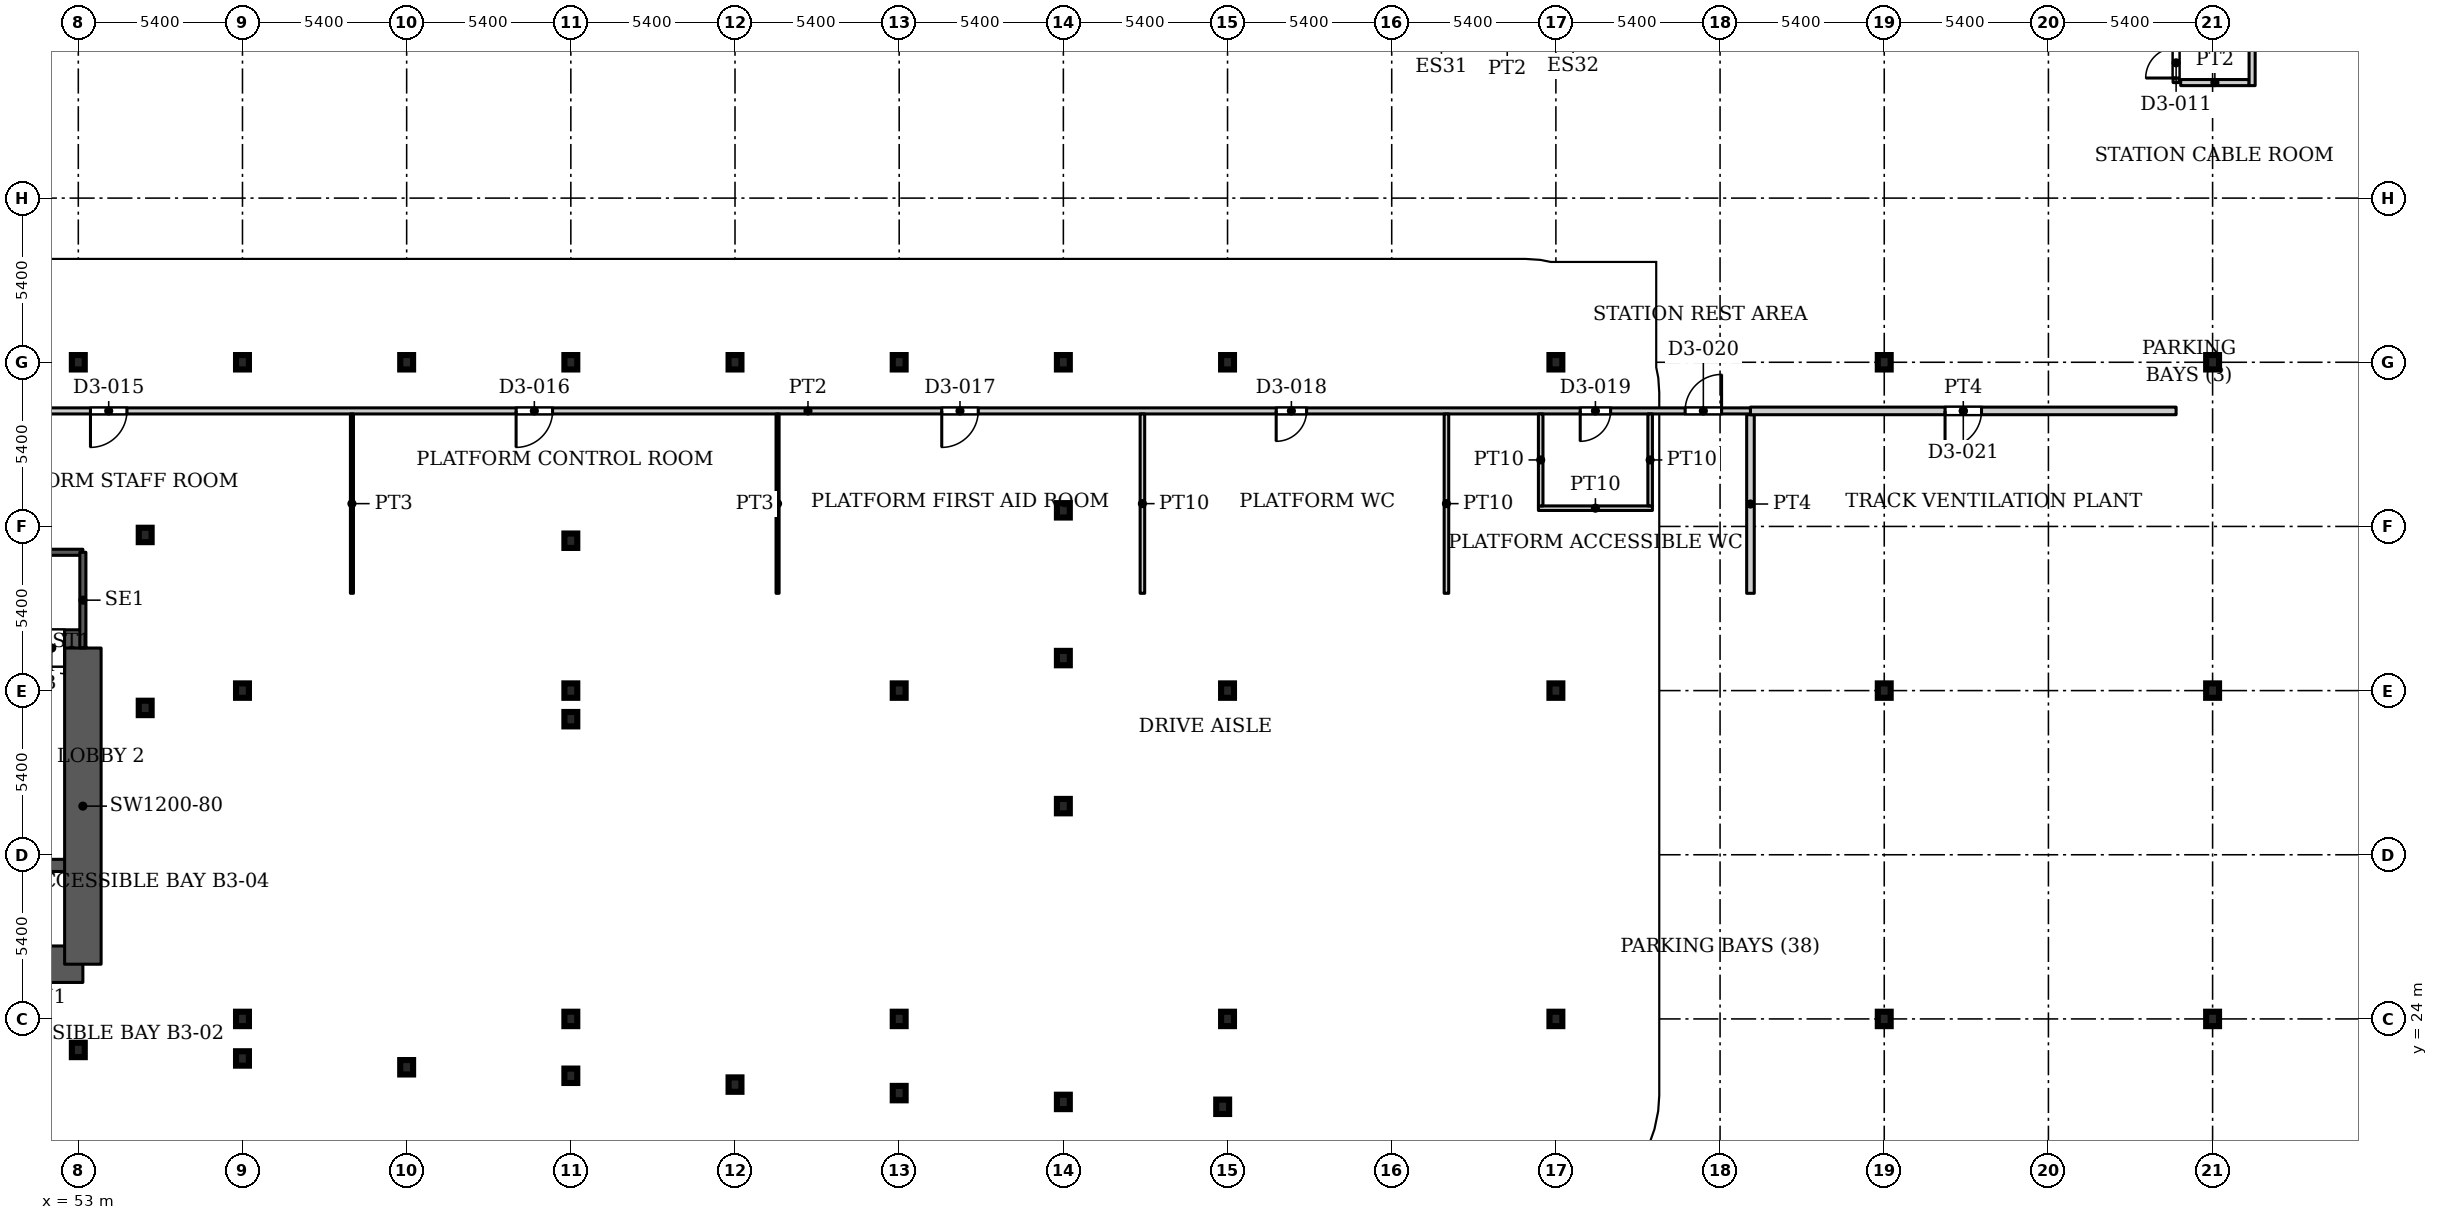
"""IFC4 building model, lengths in metres.
Left out: names, types, materials, properties, quantities, classifications, styles, units other than length and angle.
Written with IfcOpenShell. Run it as: python <this file> out.ifc"""

import sys

from ifc_helpers import new_model, si_unit, direction, frame, frame_2d, origin, origin_2d, place, context, subcontext, project, spatial, rectangle, i_section, extrude, source, transform, mapped, element, fill, save


model = new_model("IFC4")
c1 = context("Model", 3, precision=1e-05, world=origin(), true_north=direction((0.0, 1.0)))
c2 = subcontext(c1, "Body", "Model", "MODEL_VIEW")
j1 = project(units=[si_unit("LENGTHUNIT", "METRE"), si_unit("PLANEANGLEUNIT", "RADIAN")], contexts=[c1])
p1 = place(None, origin())
s1 = spatial("IfcSite", under=j1, at=p1, CompositionType="ELEMENT")
p2 = place(p1, origin())
s2 = spatial("IfcBuilding", under=s1, at=p2, CompositionType="ELEMENT")
p3 = place(p2, frame((0.0, 0.0, -15.0)))
s3 = spatial("IfcBuildingStorey", under=s2, at=p3, CompositionType="ELEMENT", Elevation=-15.0)
for number, where, z_axis, x_axis in (
    (1, (58.4, 24.0, 0.0), (0.0, 0.0, 1.0), (1.0, 0.0, 0.0)),
    (2, (69.2, 24.0, 0.0), (0.0, 0.0, 1.0), (1.0, 0.0, 0.0)),
    (3, (80.0, 24.0, 0.0), (0.0, 0.0, 1.0), (1.0, 0.0, 0.0)),
    (4, (90.8, 24.0, 0.0), (0.0, 0.0, 1.0), (1.0, 0.0, 0.0)),
    (5, (101.6, 24.0, 0.0), (0.0, 0.0, 1.0), (1.0, 0.0, 0.0)),
    (6, (112.4, 24.0, 0.0), (0.0, 0.0, 1.0), (1.0, 0.0, 0.0)),
    (7, (123.2, 24.0, 0.0), (0.0, 0.0, 1.0), (1.0, 0.0, 0.0)),
    (8, (58.4, 34.8, 0.0), (0.0, 0.0, 1.0), (1.0, 0.0, 0.0)),
    (9, (69.2, 34.8, 0.0), (0.0, 0.0, 1.0), (1.0, 0.0, 0.0)),
    (10, (80.0, 34.8, 0.0), (0.0, 0.0, 1.0), (1.0, 0.0, 0.0)),
    (11, (90.8, 34.8, 0.0), (0.0, 0.0, 1.0), (1.0, 0.0, 0.0)),
    (12, (101.6, 34.8, 0.0), (0.0, 0.0, 1.0), (1.0, 0.0, 0.0)),
    (13, (112.4, 34.8, 0.0), (0.0, 0.0, 1.0), (1.0, 0.0, 0.0)),
    (14, (123.2, 34.8, 0.0), (0.0, 0.0, 1.0), (1.0, 0.0, 0.0)),
    (15, (58.4, 45.6, 0.0), (0.0, 0.0, 1.0), (1.0, 0.0, 0.0)),
    (16, (69.2, 45.6, 0.0), (0.0, 0.0, 1.0), (1.0, 0.0, 0.0)),
    (17, (80.0, 45.6, 0.0), (0.0, 0.0, 1.0), (1.0, 0.0, 0.0)),
    (18, (90.8, 45.6, 0.0), (0.0, 0.0, 1.0), (1.0, 0.0, 0.0)),
    (19, (101.6, 45.6, 0.0), (0.0, 0.0, 1.0), (1.0, 0.0, 0.0)),
    (20, (112.4, 45.6, 0.0), (0.0, 0.0, 1.0), (1.0, 0.0, 0.0)),
    (21, (123.2, 45.6, 0.0), (0.0, 0.0, 1.0), (1.0, 0.0, 0.0)),
    (22, (90.64, 21.11, 0.0), (0.0, 0.0, 1.0), (1.0, 0.0, 0.0)),
    (23, (85.4, 21.27, 0.0), (0.0, 0.0, 1.0), (1.0, 0.0, 0.0)),
    (24, (80.0, 21.56, 0.0), (0.0, 0.0, 1.0), (1.0, 0.0, 0.0)),
    (25, (74.6, 21.84, 0.0), (0.0, 0.0, 1.0), (1.0, 0.0, 0.0)),
    (26, (69.2, 22.13, 0.0), (0.0, 0.0, 1.0), (1.0, 0.0, 0.0)),
    (27, (63.8, 22.41, 0.0), (0.0, 0.0, 1.0), (1.0, 0.0, 0.0)),
    (28, (58.4, 22.7, 0.0), (0.0, 0.0, 1.0), (1.0, 0.0, 0.0)),
    (29, (53.0, 22.98, 0.0), (0.0, 0.0, 1.0), (1.0, 0.0, 0.0)),
    (30, (53.0, 45.6, 0.0), (0.0, 0.0, 1.0), (1.0, 0.0, 0.0)),
    (31, (63.8, 45.6, 0.0), (0.0, 0.0, 1.0), (1.0, 0.0, 0.0)),
    (32, (74.6, 45.6, 0.0), (0.0, 0.0, 1.0), (1.0, 0.0, 0.0)),
    (33, (85.4, 45.6, 0.0), (0.0, 0.0, 1.0), (1.0, 0.0, 0.0)),
    (34, (85.4, 31.0, 0.0), (0.0, 0.0, 1.0), (1.0, 0.0, 0.0)),
    (35, (69.2, 33.86, 0.0), (0.0, 0.0, 1.0), (1.0, 0.0, 0.0)),
    (36, (55.2, 34.23, 0.0), (0.0, 0.0, 1.0), (1.0, 0.0, 0.0)),
    (37, (85.4, 35.87, 0.0), (0.0, 0.0, 1.0), (1.0, 0.0, 0.0)),
    (38, (69.2, 39.73, 0.0), (0.0, 0.0, 1.0), (1.0, 0.0, 0.0)),
    (39, (55.2, 39.92, 0.0), (0.0, 0.0, 1.0), (1.0, 0.0, 0.0)),
    (40, (85.4, 40.73, 0.0), (0.0, 0.0, 1.0), (1.0, 0.0, 0.0)),
):
    element("IfcColumn", number, at=place(p3, frame(where, z_axis=z_axis, x_axis=x_axis)), inside=s3, PredefinedType="COLUMN", context=c2, shape_type="SweptSolid", body=[
        extrude(i_section(OverallWidth=0.424, OverallDepth=0.474, WebThickness=0.048, FlangeThickness=0.077, FilletRadius=0.014, at=origin_2d()), origin(), (0.0, 0.0, 1.0), 5.0),
    ])
p4 = place(p3, frame((34.75, 25.8, 0.0), z_axis=(0.0, 0.0, 1.0), x_axis=(1.0, 0.0, 0.0)))
e41 = element("IfcWall", 41, at=p4, inside=s3, PredefinedType="SHEAR", context=c2, shape_type="SweptSolid", body=[
    extrude(rectangle(XDim=18.4, YDim=1.2, at=frame_2d((9.2, 0.0))), origin(), (0.0, 0.0, 1.0), 5.0),
])
p5 = place(p3, frame((34.75, 29.05, 0.0), z_axis=(0.0, 0.0, 1.0), x_axis=(1.0, 0.0, 0.0)))
e42 = element("IfcWall", 42, at=p5, inside=s3, PredefinedType="SHEAR", context=c2, shape_type="SweptSolid", body=[
    extrude(rectangle(XDim=18.4, YDim=0.4, at=frame_2d((9.2, 0.0))), origin(), (0.0, 0.0, 1.0), 5.0),
])
p6 = place(p5, frame((15.125, 0.0, 0.0)))
e43 = element("IfcOpeningElement", 43, at=p6, cuts=e42, PredefinedType="OPENING", context=c2, shape_type="SweptSolid", body=[
    extrude(rectangle(XDim=1.1, YDim=2.2, at=frame_2d((0.55, 1.1))), frame((0.0, 0.21, 0.0), z_axis=(0.0, -1.0, 0.0), x_axis=(1.0, 0.0, 0.0)), (0.0, 0.0, 1.0), 0.42),
])
p7 = place(p3, frame((34.75, 36.2, 0.0), z_axis=(0.0, 0.0, 1.0), x_axis=(1.0, 0.0, 0.0)))
e44 = element("IfcWall", 44, at=p7, inside=s3, PredefinedType="SHEAR", context=c2, shape_type="SweptSolid", body=[
    extrude(rectangle(XDim=18.4, YDim=1.2, at=frame_2d((9.2, 0.0))), origin(), (0.0, 0.0, 1.0), 5.0),
])
p8 = place(p7, frame((16.955, 0.0, 0.0)))
e45 = element("IfcOpeningElement", 45, at=p8, cuts=e44, PredefinedType="OPENING", context=c2, shape_type="SweptSolid", body=[
    extrude(rectangle(XDim=0.843, YDim=2.2, at=frame_2d((0.421, 1.1))), frame((0.0, 0.61, 0.0), z_axis=(0.0, -1.0, 0.0), x_axis=(1.0, 0.0, 0.0)), (0.0, 0.0, 1.0), 1.22),
])
p9 = place(p3, frame((53.15, 25.8, 0.0), z_axis=(0.0, 0.0, 1.0), x_axis=(0.0, 1.0, 0.0)))
e46 = element("IfcWall", 46, at=p9, inside=s3, PredefinedType="SHEAR", context=c2, shape_type="SweptSolid", body=[
    extrude(rectangle(XDim=10.4, YDim=1.2, at=frame_2d((5.2, 0.0))), origin(), (0.0, 0.0, 1.0), 5.0),
])
p10 = place(p3, frame((43.99, 39.35, 0.0), z_axis=(0.0, 0.0, 1.0), x_axis=(1.0, 0.0, 0.0)))
e47 = element("IfcWall", 47, at=p10, inside=s3, PredefinedType="SHEAR", context=c2, shape_type="SweptSolid", body=[
    extrude(rectangle(XDim=9.16, YDim=0.2, at=frame_2d((4.58, 0.0))), origin(), (0.0, 0.0, 1.0), 5.0),
])
p11 = place(p3, frame((53.15, 36.2, 0.0), z_axis=(0.0, 0.0, 1.0), x_axis=(0.0, 1.0, 0.0)))
e48 = element("IfcWall", 48, at=p11, inside=s3, PredefinedType="SHEAR", context=c2, shape_type="SweptSolid", body=[
    extrude(rectangle(XDim=3.15, YDim=0.2, at=frame_2d((1.575, 0.0))), origin(), (0.0, 0.0, 1.0), 5.0),
])
p12 = place(p3, frame((46.0, 44.0, 0.0), z_axis=(0.0, 0.0, 1.0), x_axis=(1.0, 0.0, 0.0)))
e49 = element("IfcWall", 49, at=p12, inside=s3, PredefinedType="PARTITIONING", context=c2, shape_type="SweptSolid", body=[
    extrude(rectangle(XDim=62.0, YDim=0.2, at=frame_2d((31.0, 0.0))), origin(), (0.0, 0.0, 1.0), 4.68),
])
p13 = place(p12, frame((7.4, 0.0, 0.0)))
e50 = element("IfcOpeningElement", 50, at=p13, cuts=e49, PredefinedType="OPENING", context=c2, shape_type="SweptSolid", body=[
    extrude(rectangle(XDim=1.2, YDim=2.1, at=frame_2d((0.6, 1.05))), frame((0.0, 0.11, 0.0), z_axis=(0.0, -1.0, 0.0), x_axis=(1.0, 0.0, 0.0)), (0.0, 0.0, 1.0), 0.22),
])
p14 = place(p12, frame((21.4, 0.0, 0.0)))
e51 = element("IfcOpeningElement", 51, at=p14, cuts=e49, PredefinedType="OPENING", context=c2, shape_type="SweptSolid", body=[
    extrude(rectangle(XDim=1.2, YDim=2.1, at=frame_2d((0.6, 1.05))), frame((0.0, 0.11, 0.0), z_axis=(0.0, -1.0, 0.0), x_axis=(1.0, 0.0, 0.0)), (0.0, 0.0, 1.0), 0.22),
])
p15 = place(p12, frame((35.4, 0.0, 0.0)))
e52 = element("IfcOpeningElement", 52, at=p15, cuts=e49, PredefinedType="OPENING", context=c2, shape_type="SweptSolid", body=[
    extrude(rectangle(XDim=1.2, YDim=2.1, at=frame_2d((0.6, 1.05))), frame((0.0, 0.11, 0.0), z_axis=(0.0, -1.0, 0.0), x_axis=(1.0, 0.0, 0.0)), (0.0, 0.0, 1.0), 0.22),
])
p16 = place(p12, frame((46.4, 0.0, 0.0)))
e53 = element("IfcOpeningElement", 53, at=p16, cuts=e49, PredefinedType="OPENING", context=c2, shape_type="SweptSolid", body=[
    extrude(rectangle(XDim=1.0, YDim=2.1, at=frame_2d((0.5, 1.05))), frame((0.0, 0.11, 0.0), z_axis=(0.0, -1.0, 0.0), x_axis=(1.0, 0.0, 0.0)), (0.0, 0.0, 1.0), 0.22),
])
p17 = place(p12, frame((56.4, 0.0, 0.0)))
e54 = element("IfcOpeningElement", 54, at=p17, cuts=e49, PredefinedType="OPENING", context=c2, shape_type="SweptSolid", body=[
    extrude(rectangle(XDim=1.0, YDim=2.1, at=frame_2d((0.5, 1.05))), frame((0.0, 0.11, 0.0), z_axis=(0.0, -1.0, 0.0), x_axis=(1.0, 0.0, 0.0)), (0.0, 0.0, 1.0), 0.22),
])
p18 = place(p12, frame((59.85, 0.0, 0.0)))
e55 = element("IfcOpeningElement", 55, at=p18, cuts=e49, PredefinedType="OPENING", context=c2, shape_type="SweptSolid", body=[
    extrude(rectangle(XDim=1.2, YDim=2.1, at=frame_2d((0.6, 1.05))), frame((0.0, 0.11, 0.0), z_axis=(0.0, -1.0, 0.0), x_axis=(1.0, 0.0, 0.0)), (0.0, 0.0, 1.0), 0.22),
])
for number, where, z_axis, x_axis in (
    (56, (62.0, 38.0, 0.0), (0.0, 0.0, 1.0), (0.0, 1.0, 0.0)),
    (57, (76.0, 38.0, 0.0), (0.0, 0.0, 1.0), (0.0, 1.0, 0.0)),
):
    element("IfcWall", number, at=place(p3, frame(where, z_axis=z_axis, x_axis=x_axis)), inside=s3, PredefinedType="PARTITIONING", context=c2, shape_type="SweptSolid", body=[
        extrude(rectangle(XDim=5.9, YDim=0.1, at=frame_2d((2.95, 0.0))), origin(), (0.0, 0.0, 1.0), 4.68),
    ])
for number, where, z_axis, x_axis in (
    (58, (88.0, 38.0, 0.0), (0.0, 0.0, 1.0), (0.0, 1.0, 0.0)),
    (59, (98.0, 38.0, 0.0), (0.0, 0.0, 1.0), (0.0, 1.0, 0.0)),
):
    element("IfcWall", number, at=place(p3, frame(where, z_axis=z_axis, x_axis=x_axis)), inside=s3, PredefinedType="PARTITIONING", context=c2, shape_type="SweptSolid", body=[
        extrude(rectangle(XDim=5.9, YDim=0.15, at=frame_2d((2.95, 0.0))), origin(), (0.0, 0.0, 1.0), 4.68),
    ])
p19 = place(p3, frame((101.025, 40.8, 0.0), z_axis=(0.0, 0.0, 1.0), x_axis=(1.0, 0.0, 0.0)))
e60 = element("IfcWall", 60, at=p19, inside=s3, PredefinedType="PARTITIONING", context=c2, shape_type="SweptSolid", body=[
    extrude(rectangle(XDim=3.75, YDim=0.15, at=frame_2d((1.875, 0.0))), origin(), (0.0, 0.0, 1.0), 4.68),
])
for number, where, z_axis, x_axis in (
    (61, (101.1, 40.875, 0.0), (0.0, 0.0, 1.0), (0.0, 1.0, 0.0)),
    (62, (104.7, 40.875, 0.0), (0.0, 0.0, 1.0), (0.0, 1.0, 0.0)),
):
    element("IfcWall", number, at=place(p3, frame(where, z_axis=z_axis, x_axis=x_axis)), inside=s3, PredefinedType="PARTITIONING", context=c2, shape_type="SweptSolid", body=[
        extrude(rectangle(XDim=3.025, YDim=0.15, at=frame_2d((1.512, 0.0))), origin(), (0.0, 0.0, 1.0), 4.68),
    ])
p20 = place(p3, frame((108.0, 38.0, 0.0), z_axis=(0.0, 0.0, 1.0), x_axis=(0.0, 1.0, 0.0)))
e63 = element("IfcWall", 63, at=p20, inside=s3, PredefinedType="PARTITIONING", context=c2, shape_type="SweptSolid", body=[
    extrude(rectangle(XDim=5.875, YDim=0.25, at=frame_2d((2.938, 0.0))), origin(), (0.0, 0.0, 1.0), 4.68),
])
p21 = place(p3, frame((108.0, 44.0, 0.0), z_axis=(0.0, 0.0, 1.0), x_axis=(1.0, 0.0, 0.0)))
e64 = element("IfcWall", 64, at=p21, inside=s3, PredefinedType="PARTITIONING", context=c2, shape_type="SweptSolid", body=[
    extrude(rectangle(XDim=14.0, YDim=0.25, at=frame_2d((7.0, 0.0))), origin(), (0.0, 0.0, 1.0), 4.68),
])
p22 = place(p21, frame((6.4, 0.0, 0.0)))
e65 = element("IfcOpeningElement", 65, at=p22, cuts=e64, PredefinedType="OPENING", context=c2, shape_type="SweptSolid", body=[
    extrude(rectangle(XDim=1.2, YDim=2.1, at=frame_2d((0.6, 1.05))), frame((0.0, 0.135, 0.0), z_axis=(0.0, -1.0, 0.0), x_axis=(1.0, 0.0, 0.0)), (0.0, 0.0, 1.0), 0.27),
])
p23 = place(p3, frame((122.0, 54.8, 0.0), z_axis=(0.0, 0.0, 1.0), x_axis=(0.0, 1.0, 0.0)))
e66 = element("IfcWall", 66, at=p23, inside=s3, PredefinedType="PARTITIONING", context=c2, shape_type="SweptSolid", body=[
    extrude(rectangle(XDim=2.4, YDim=0.2, at=frame_2d((1.2, 0.0))), origin(), (0.0, 0.0, 1.0), 4.68),
])
p24 = place(p23, frame((0.15, 0.0, 0.0)))
e67 = element("IfcOpeningElement", 67, at=p24, cuts=e66, PredefinedType="OPENING", context=c2, shape_type="SweptSolid", body=[
    extrude(rectangle(XDim=1.0, YDim=2.1, at=frame_2d((0.5, 1.05))), frame((0.0, 0.11, 0.0), z_axis=(0.0, -1.0, 0.0), x_axis=(1.0, 0.0, 0.0)), (0.0, 0.0, 1.0), 0.22),
])
p25 = place(p3, frame((122.15, 54.8, 0.0), z_axis=(0.0, 0.0, 1.0), x_axis=(1.0, 0.0, 0.0)))
e68 = element("IfcWall", 68, at=p25, inside=s3, PredefinedType="PARTITIONING", context=c2, shape_type="SweptSolid", body=[
    extrude(rectangle(XDim=2.25, YDim=0.2, at=frame_2d((1.125, 0.0))), origin(), (0.0, 0.0, 1.0), 4.68),
])
p26 = place(p3, frame((124.5, 54.7, 0.0), z_axis=(0.0, 0.0, 1.0), x_axis=(0.0, 1.0, 0.0)))
e69 = element("IfcWall", 69, at=p26, inside=s3, PredefinedType="PARTITIONING", context=c2, shape_type="SweptSolid", body=[
    extrude(rectangle(XDim=2.6, YDim=0.2, at=frame_2d((1.3, 0.0))), origin(), (0.0, 0.0, 1.0), 4.68),
])
m1 = source(origin(), c2, "Body", "SweptSolid", [
    extrude(rectangle(XDim=0.843, YDim=2.2, at=frame_2d((0.421, 1.1))), frame((0.0, 0.025, 0.0), z_axis=(0.0, -1.0, 0.0), x_axis=(1.0, 0.0, 0.0)), (0.0, 0.0, 1.0), 0.05),
])
p27 = place(p8, origin())
e70 = element("IfcDoor", 70, at=p27, inside=s3, OperationType="SINGLE_SWING_RIGHT", PredefinedType="DOOR", context=c2, shape_type="MappedRepresentation", body=[
    mapped(m1, transform((0.0, 0.0, 0.0), x_axis=(1.0, 0.0, 0.0), y_axis=(0.0, 1.0, 0.0), z_axis=(0.0, 0.0, 1.0), scale=1.0)),
])
fill(e45, e70)
m2 = source(origin(), c2, "Body", "SweptSolid", [
    extrude(rectangle(XDim=1.0, YDim=2.1, at=frame_2d((0.5, 1.05))), frame((0.0, 0.025, 0.0), z_axis=(0.0, -1.0, 0.0), x_axis=(1.0, 0.0, 0.0)), (0.0, 0.0, 1.0), 0.05),
])
p28 = place(p24, origin())
e71 = element("IfcDoor", 71, at=p28, inside=s3, OperationType="SINGLE_SWING_LEFT", PredefinedType="DOOR", context=c2, shape_type="MappedRepresentation", body=[
    mapped(m2, transform((0.0, 0.0, 0.0), x_axis=(1.0, 0.0, 0.0), y_axis=(0.0, 1.0, 0.0), z_axis=(0.0, 0.0, 1.0), scale=1.0)),
])
fill(e67, e71)
m3 = source(origin(), c2, "Body", "SweptSolid", [
    extrude(rectangle(XDim=1.2, YDim=2.1, at=frame_2d((0.6, 1.05))), frame((0.0, 0.025, 0.0), z_axis=(0.0, -1.0, 0.0), x_axis=(1.0, 0.0, 0.0)), (0.0, 0.0, 1.0), 0.05),
])
p29 = place(p13, origin())
e72 = element("IfcDoor", 72, at=p29, inside=s3, OperationType="SINGLE_SWING_RIGHT", PredefinedType="DOOR", context=c2, shape_type="MappedRepresentation", body=[
    mapped(m3, transform((0.0, 0.0, 0.0), x_axis=(1.0, 0.0, 0.0), y_axis=(0.0, 1.0, 0.0), z_axis=(0.0, 0.0, 1.0), scale=1.0)),
])
fill(e50, e72)
p30 = place(p14, origin())
e73 = element("IfcDoor", 73, at=p30, inside=s3, OperationType="SINGLE_SWING_RIGHT", PredefinedType="DOOR", context=c2, shape_type="MappedRepresentation", body=[
    mapped(m3, transform((0.0, 0.0, 0.0), x_axis=(1.0, 0.0, 0.0), y_axis=(0.0, 1.0, 0.0), z_axis=(0.0, 0.0, 1.0), scale=1.0)),
])
fill(e51, e73)
p31 = place(p15, origin())
e74 = element("IfcDoor", 74, at=p31, inside=s3, OperationType="SINGLE_SWING_RIGHT", PredefinedType="DOOR", context=c2, shape_type="MappedRepresentation", body=[
    mapped(m3, transform((0.0, 0.0, 0.0), x_axis=(1.0, 0.0, 0.0), y_axis=(0.0, 1.0, 0.0), z_axis=(0.0, 0.0, 1.0), scale=1.0)),
])
fill(e52, e74)
p32 = place(p16, origin())
e75 = element("IfcDoor", 75, at=p32, inside=s3, OperationType="SINGLE_SWING_RIGHT", PredefinedType="DOOR", context=c2, shape_type="MappedRepresentation", body=[
    mapped(m2, transform((0.0, 0.0, 0.0), x_axis=(1.0, 0.0, 0.0), y_axis=(0.0, 1.0, 0.0), z_axis=(0.0, 0.0, 1.0), scale=1.0)),
])
fill(e53, e75)
p33 = place(p17, origin())
e76 = element("IfcDoor", 76, at=p33, inside=s3, OperationType="SINGLE_SWING_RIGHT", PredefinedType="DOOR", context=c2, shape_type="MappedRepresentation", body=[
    mapped(m2, transform((0.0, 0.0, 0.0), x_axis=(1.0, 0.0, 0.0), y_axis=(0.0, 1.0, 0.0), z_axis=(0.0, 0.0, 1.0), scale=1.0)),
])
fill(e54, e76)
p34 = place(p18, origin())
e77 = element("IfcDoor", 77, at=p34, inside=s3, OperationType="SINGLE_SWING_LEFT", PredefinedType="DOOR", context=c2, shape_type="MappedRepresentation", body=[
    mapped(m3, transform((0.0, 0.0, 0.0), x_axis=(1.0, 0.0, 0.0), y_axis=(0.0, 1.0, 0.0), z_axis=(0.0, 0.0, 1.0), scale=1.0)),
])
fill(e55, e77)
m4 = source(origin(), c2, "Body", "SweptSolid", [
    extrude(rectangle(XDim=1.2, YDim=2.1, at=frame_2d((0.6, 1.05))), frame((0.0, 0.025, 0.0), z_axis=(0.0, -1.0, 0.0), x_axis=(1.0, 0.0, 0.0)), (0.0, 0.0, 1.0), 0.05),
])
p35 = place(p22, origin())
e78 = element("IfcDoor", 78, at=p35, inside=s3, OperationType="SINGLE_SWING_RIGHT", PredefinedType="DOOR", context=c2, shape_type="MappedRepresentation", body=[
    mapped(m4, transform((0.0, 0.0, 0.0), x_axis=(1.0, 0.0, 0.0), y_axis=(0.0, 1.0, 0.0), z_axis=(0.0, 0.0, 1.0), scale=1.0)),
])
fill(e65, e78)
save(model, sys.argv[1])
